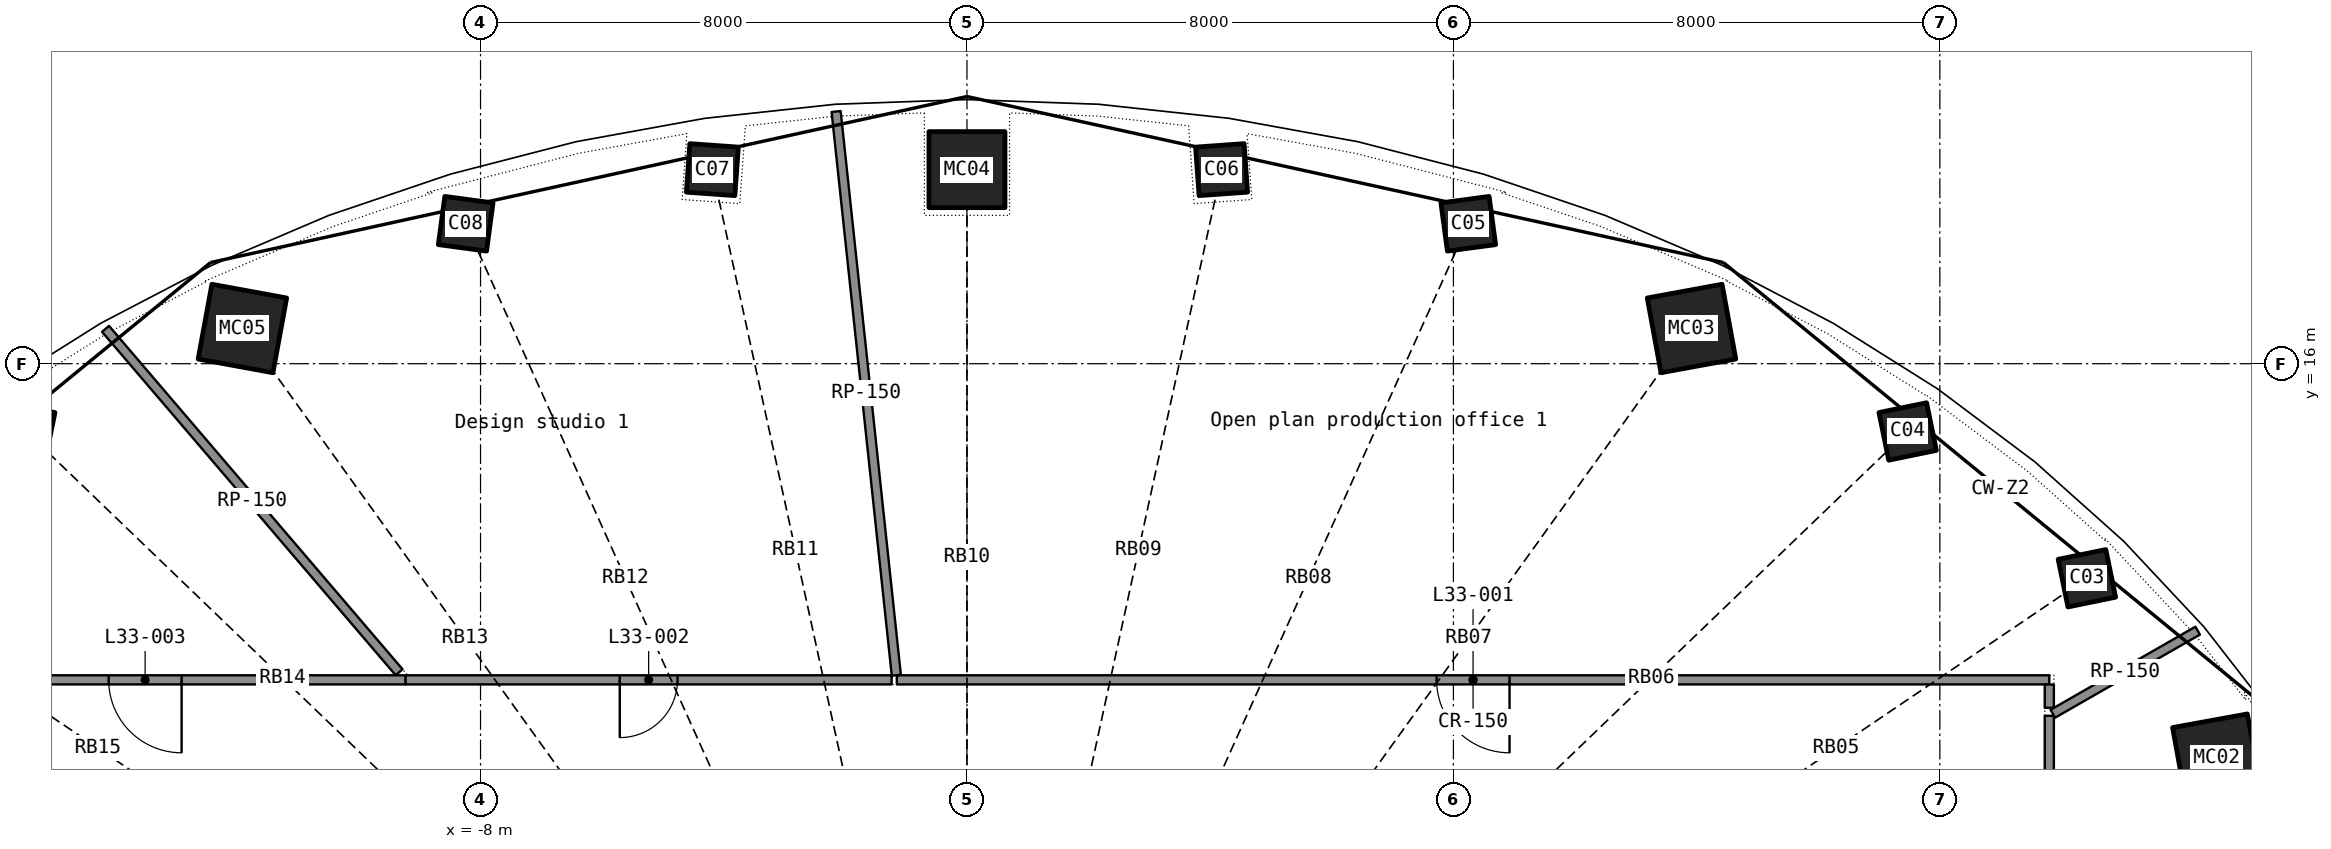
"""IFC4 building model, lengths in metres.
Left out: names, types, materials, properties, quantities, classifications, styles, units other than length and angle.
Written with IfcOpenShell. Run it as: python <this file> out.ifc"""

import sys

from ifc_helpers import new_model, si_unit, direction, frame, frame_2d, origin, origin_2d, place, context, subcontext, project, spatial, rectangle, hollow_rectangle, extrude, element, fill, save


model = new_model("IFC4")
c1 = context("Model", 3, precision=1e-05, world=origin(), true_north=direction((0.0, 1.0)))
c2 = subcontext(c1, "Body", "Model", "MODEL_VIEW")
j1 = project(units=[si_unit("LENGTHUNIT", "METRE"), si_unit("PLANEANGLEUNIT", "RADIAN")], contexts=[c1])
p1 = place(None, origin())
s1 = spatial("IfcSite", under=j1, at=p1, CompositionType="ELEMENT")
p2 = place(p1, origin())
s2 = spatial("IfcBuilding", under=s1, at=p2, CompositionType="ELEMENT")
p3 = place(p2, frame((0.0, 0.0, 137.8)))
s3 = spatial("IfcBuildingStorey", under=s2, at=p3, CompositionType="ELEMENT", Elevation=137.8)
p4 = place(p3, frame((20.555, 9.512, 0.0), z_axis=(-0.029940667, -0.01417895, 0.999451106), x_axis=(0.583250147, -0.812270814, 0.005949016)))
e1 = element("IfcColumn", 1, at=p4, inside=s3, PredefinedType="COLUMN", context=c2, shape_type="SweptSolid", body=[
    extrude(hollow_rectangle(XDim=1.25, YDim=1.25, WallThickness=0.032, at=origin_2d()), origin(), (0.0, 0.0, 1.0), 3.702),
])
p5 = place(p3, frame((18.418, 12.471, 0.0), z_axis=(-0.026446242, -0.018268352, 0.999483298), x_axis=(0.721972796, -0.691891312, 0.00645709)))
e2 = element("IfcColumn", 2, at=p5, inside=s3, PredefinedType="COLUMN", context=c2, shape_type="SweptSolid", body=[
    extrude(hollow_rectangle(XDim=0.8, YDim=0.8, WallThickness=0.025, at=origin_2d()), origin(), (0.0, 0.0, 1.0), 3.702),
])
p6 = place(p3, frame((15.471, 14.885, 0.0), z_axis=(-0.022292076, -0.0216985, 0.999516002), x_axis=(0.827314223, -0.561704567, 0.006257434)))
e3 = element("IfcColumn", 3, at=p6, inside=s3, PredefinedType="COLUMN", context=c2, shape_type="SweptSolid", body=[
    extrude(hollow_rectangle(XDim=0.8, YDim=0.8, WallThickness=0.025, at=origin_2d()), origin(), (0.0, 0.0, 1.0), 3.702),
])
p7 = place(p3, frame((11.916, 16.579, 0.0), z_axis=(-0.017280237, -0.024535299, 0.999549605), x_axis=(0.908022718, -0.418885919, 0.005415796)))
e4 = element("IfcColumn", 4, at=p7, inside=s3, PredefinedType="COLUMN", context=c2, shape_type="SweptSolid", body=[
    extrude(hollow_rectangle(XDim=1.25, YDim=1.25, WallThickness=0.032, at=origin_2d()), origin(), (0.0, 0.0, 1.0), 3.702),
])
for number, where, z_axis, x_axis in (
    (5, (8.244, 18.302, 0.0), (-0.012, -0.027, 1.0), (0.959, -0.282, 0.004)),
    (6, (4.188, 19.192, 0.0), (-0.006, -0.028, 1.0), (0.99, -0.14, 0.002)),
):
    element("IfcColumn", number, at=place(p3, frame(where, z_axis=z_axis, x_axis=x_axis)), inside=s3, PredefinedType="COLUMN", context=c2, shape_type="SweptSolid", body=[
        extrude(hollow_rectangle(XDim=0.8, YDim=0.8, WallThickness=0.025, at=origin_2d()), origin(), (0.0, 0.0, 1.0), 3.701),
    ])
p8 = place(p3, frame((0.0, 19.192, 0.0), z_axis=(0.0, -0.02836206, 0.999597716), x_axis=(1.0, 0.0, 0.0)))
e7 = element("IfcColumn", 7, at=p8, inside=s3, PredefinedType="COLUMN", context=c2, shape_type="SweptSolid", body=[
    extrude(hollow_rectangle(XDim=1.25, YDim=1.25, WallThickness=0.032, at=origin_2d()), origin(), (0.0, 0.0, 1.0), 3.701),
])
for number, where, z_axis, x_axis in (
    (8, (-4.188, 19.192, 0.0), (0.006, -0.028, 1.0), (0.99, 0.14, -0.002)),
    (9, (-8.244, 18.302, 0.0), (0.012, -0.027, 1.0), (0.959, 0.282, -0.004)),
):
    element("IfcColumn", number, at=place(p3, frame(where, z_axis=z_axis, x_axis=x_axis)), inside=s3, PredefinedType="COLUMN", context=c2, shape_type="SweptSolid", body=[
        extrude(hollow_rectangle(XDim=0.8, YDim=0.8, WallThickness=0.025, at=origin_2d()), origin(), (0.0, 0.0, 1.0), 3.701),
    ])
p9 = place(p3, frame((-11.916, 16.579, 0.0), z_axis=(0.017280237, -0.024535299, 0.999549605), x_axis=(0.908022718, 0.418885919, -0.005415796)))
e10 = element("IfcColumn", 10, at=p9, inside=s3, PredefinedType="COLUMN", context=c2, shape_type="SweptSolid", body=[
    extrude(hollow_rectangle(XDim=1.25, YDim=1.25, WallThickness=0.032, at=origin_2d()), origin(), (0.0, 0.0, 1.0), 3.702),
])
p10 = place(p3, frame((-15.471, 14.885, 0.0), z_axis=(0.022292076, -0.0216985, 0.999516002), x_axis=(0.827314223, 0.561704567, -0.006257434)))
e11 = element("IfcColumn", 11, at=p10, inside=s3, PredefinedType="COLUMN", context=c2, shape_type="SweptSolid", body=[
    extrude(hollow_rectangle(XDim=0.8, YDim=0.8, WallThickness=0.025, at=origin_2d()), origin(), (0.0, 0.0, 1.0), 3.702),
])
p11 = place(p3, frame((17.8, 10.8, 0.0), z_axis=(0.0, 0.0, 1.0), x_axis=(-1.0, 0.0, 0.0)))
e12 = element("IfcWall", 12, at=p11, inside=s3, PredefinedType="PARTITIONING", context=c2, shape_type="SweptSolid", body=[
    extrude(rectangle(XDim=18.954, YDim=0.15, at=frame_2d((9.477, 0.0))), origin(), (0.0, 0.0, 1.0), 2.4),
])
p12 = place(p11, frame((8.877, 0.0, 0.0)))
e13 = element("IfcOpeningElement", 13, at=p12, cuts=e12, PredefinedType="OPENING", context=c2, shape_type="SweptSolid", body=[
    extrude(rectangle(XDim=1.2, YDim=2.2, at=frame_2d((0.6, 1.1))), frame((0.0, 0.085, 0.0), z_axis=(0.0, -1.0, 0.0), x_axis=(1.0, 0.0, 0.0)), (0.0, 0.0, 1.0), 0.17),
])
p13 = place(p3, frame((-2.152, 20.148, 0.0), z_axis=(0.0, 0.0, 1.0), x_axis=(0.106226181, -0.994341993, 0.0)))
e14 = element("IfcWall", 14, at=p13, inside=s3, PredefinedType="PARTITIONING", context=c2, shape_type="SweptSolid", body=[
    extrude(rectangle(XDim=9.324, YDim=0.15, at=frame_2d((4.662, 0.0))), origin(), (0.0, 0.0, 1.0), 2.4),
])
p14 = place(p3, frame((-9.232, 10.8, 0.0), z_axis=(0.0, 0.0, 1.0), x_axis=(-1.0, 0.0, 0.0)))
e15 = element("IfcWall", 15, at=p14, inside=s3, PredefinedType="PARTITIONING", context=c2, shape_type="SweptSolid", body=[
    extrude(rectangle(XDim=8.568, YDim=0.15, at=frame_2d((4.284, 0.0))), origin(), (0.0, 0.0, 1.0), 2.4),
])
p15 = place(p14, frame((3.684, 0.0, 0.0)))
e16 = element("IfcOpeningElement", 16, at=p15, cuts=e15, PredefinedType="OPENING", context=c2, shape_type="SweptSolid", body=[
    extrude(rectangle(XDim=1.2, YDim=2.2, at=frame_2d((0.6, 1.1))), frame((0.0, 0.085, 0.0), z_axis=(0.0, -1.0, 0.0), x_axis=(1.0, 0.0, 0.0)), (0.0, 0.0, 1.0), 0.17),
])
p16 = place(p3, frame((-1.239, 10.8, 0.0), z_axis=(0.0, 0.0, 1.0), x_axis=(-1.0, 0.0, 0.0)))
e17 = element("IfcWall", 17, at=p16, inside=s3, PredefinedType="PARTITIONING", context=c2, shape_type="SweptSolid", body=[
    extrude(rectangle(XDim=7.992, YDim=0.15, at=frame_2d((3.996, 0.0))), origin(), (0.0, 0.0, 1.0), 2.4),
])
p17 = place(p16, frame((3.521, 0.0, 0.0)))
e18 = element("IfcOpeningElement", 18, at=p17, cuts=e17, PredefinedType="OPENING", context=c2, shape_type="SweptSolid", body=[
    extrude(rectangle(XDim=0.95, YDim=2.15, at=frame_2d((0.475, 1.075))), frame((0.0, 0.085, 0.0), z_axis=(0.0, -1.0, 0.0), x_axis=(1.0, 0.0, 0.0)), (0.0, 0.0, 1.0), 0.17),
])
p18 = place(p3, frame((-14.167, 16.573, 0.0), z_axis=(0.0, 0.0, 1.0), x_axis=(0.64976247, -0.760137312, 0.0)))
e19 = element("IfcWall", 19, at=p18, inside=s3, PredefinedType="PARTITIONING", context=c2, shape_type="SweptSolid", body=[
    extrude(rectangle(XDim=7.43, YDim=0.15, at=frame_2d((3.715, 0.0))), origin(), (0.0, 0.0, 1.0), 2.4),
])
p19 = place(p3, frame((17.8, 7.188, 0.0), z_axis=(0.0, 0.0, 1.0), x_axis=(0.0, 1.0, 0.0)))
e20 = element("IfcWall", 20, at=p19, inside=s3, PredefinedType="PARTITIONING", context=c2, shape_type="SweptSolid", body=[
    extrude(rectangle(XDim=3.021, YDim=0.15, at=frame_2d((1.511, 0.0))), origin(), (0.0, 0.0, 1.0), 2.4),
])
p20 = place(p3, frame((17.858, 10.243, 0.0), z_axis=(0.0, 0.0, 1.0), x_axis=(0.867454205, 0.497517037, 0.0)))
e21 = element("IfcWall", 21, at=p20, inside=s3, PredefinedType="PARTITIONING", context=c2, shape_type="SweptSolid", body=[
    extrude(rectangle(XDim=2.746, YDim=0.15, at=frame_2d((1.373, 0.0))), origin(), (0.0, 0.0, 1.0), 2.4),
])
p21 = place(p3, frame((17.8, 10.341, 0.0), z_axis=(0.0, 0.0, 1.0), x_axis=(0.0, 1.0, 0.0)))
e22 = element("IfcWall", 22, at=p21, inside=s3, PredefinedType="PARTITIONING", context=c2, shape_type="SweptSolid", body=[
    extrude(rectangle(XDim=0.382, YDim=0.15, at=frame_2d((0.191, 0.0))), origin(), (0.0, 0.0, 1.0), 2.4),
])
p22 = place(p12, origin())
e23 = element("IfcDoor", 23, at=p22, inside=s3, OperationType="DOUBLE_DOOR_SINGLE_SWING", PredefinedType="DOOR", context=c2, shape_type="SweptSolid", body=[
    extrude(rectangle(XDim=1.2, YDim=2.2, at=frame_2d((0.6, 1.1))), frame((0.0, 0.025, 0.0), z_axis=(0.0, -1.0, 0.0), x_axis=(1.0, 0.0, 0.0)), (0.0, 0.0, 1.0), 0.05),
])
fill(e13, e23)
p23 = place(p17, origin())
e24 = element("IfcDoor", 24, at=p23, inside=s3, OperationType="SINGLE_SWING_RIGHT", PredefinedType="DOOR", context=c2, shape_type="SweptSolid", body=[
    extrude(rectangle(XDim=0.95, YDim=2.15, at=frame_2d((0.475, 1.075))), frame((0.0, 0.025, 0.0), z_axis=(0.0, -1.0, 0.0), x_axis=(1.0, 0.0, 0.0)), (0.0, 0.0, 1.0), 0.05),
])
fill(e18, e24)
p24 = place(p15, origin())
e25 = element("IfcDoor", 25, at=p24, inside=s3, OperationType="DOUBLE_DOOR_SINGLE_SWING", PredefinedType="DOOR", context=c2, shape_type="SweptSolid", body=[
    extrude(rectangle(XDim=1.2, YDim=2.2, at=frame_2d((0.6, 1.1))), frame((0.0, 0.025, 0.0), z_axis=(0.0, -1.0, 0.0), x_axis=(1.0, 0.0, 0.0)), (0.0, 0.0, 1.0), 0.05),
])
fill(e16, e25)
save(model, sys.argv[1])
